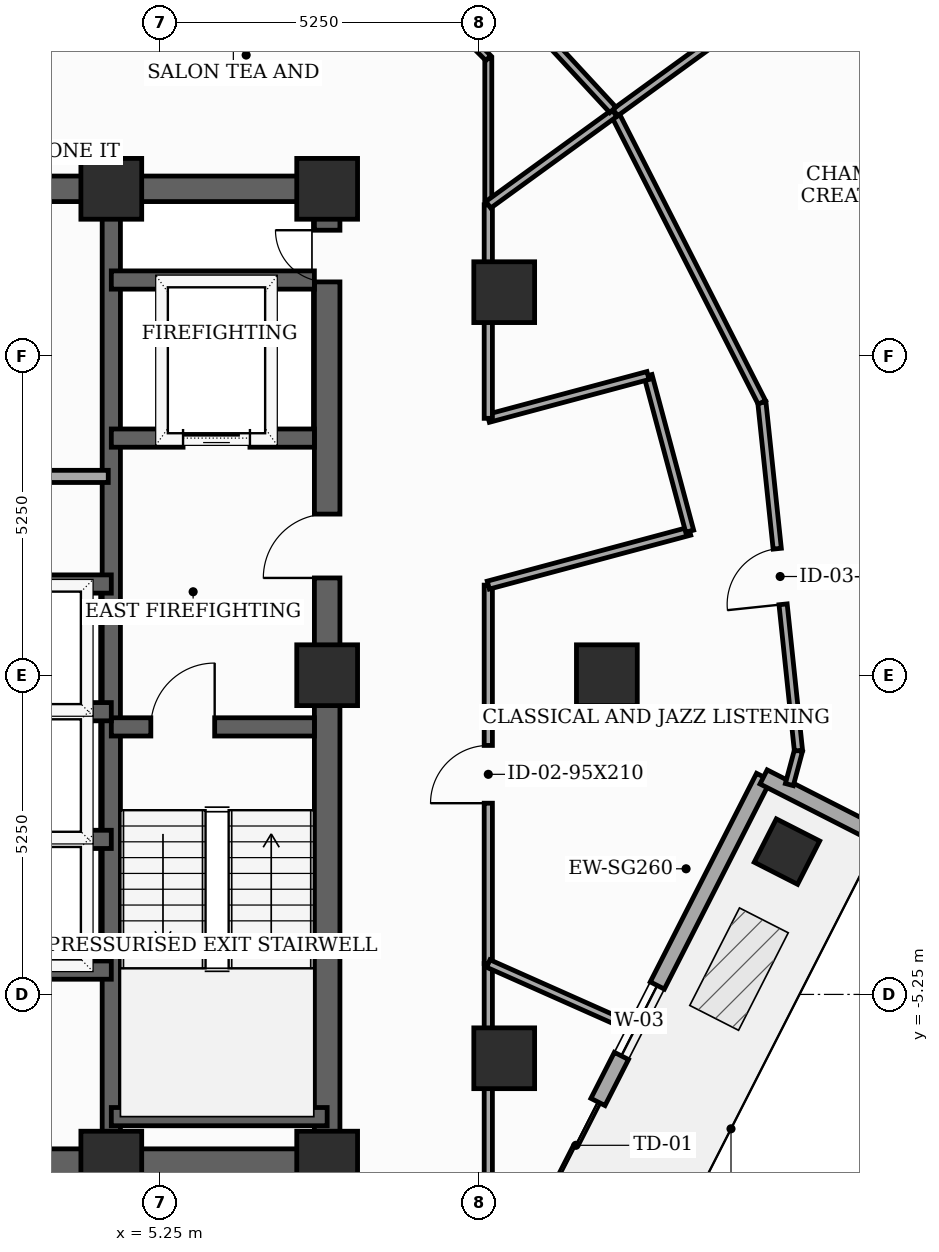
"""IFC4 building model, lengths in metres.
Left out: names, types, materials, properties, quantities, classifications, styles, units other than length and angle.
Written with IfcOpenShell. Run it as: python <this file> out.ifc"""

import sys

from ifc_helpers import new_model, si_unit, direction, frame, frame_2d, origin, origin_2d, place, context, subcontext, project, spatial, rectangle, extrude, element, fill, save


model = new_model("IFC4")
c1 = context("Model", 3, precision=1e-05, world=origin(), true_north=direction((0.0, 1.0)))
c2 = subcontext(c1, "Body", "Model", "MODEL_VIEW")
j1 = project(units=[si_unit("LENGTHUNIT", "METRE"), si_unit("PLANEANGLEUNIT", "RADIAN")], contexts=[c1])
p1 = place(None, origin())
s1 = spatial("IfcSite", under=j1, at=p1, CompositionType="ELEMENT")
p2 = place(p1, origin())
s2 = spatial("IfcBuilding", under=s1, at=p2, CompositionType="ELEMENT")
p3 = place(p2, frame((0.0, 0.0, 252.2)))
s3 = spatial("IfcBuildingStorey", under=s2, at=p3, CompositionType="ELEMENT", Elevation=252.2)
for number, where, z_axis, x_axis in (
    (1, (4.45, -8.0, 0.0), (0.0, 0.0, 1.0), (1.0, 0.0, 0.0)),
    (2, (8.0, -8.0, 0.0), (0.0, 0.0, 1.0), (1.0, 0.0, 0.0)),
    (3, (8.0, 0.0, 0.0), (0.0, 0.0, 1.0), (1.0, 0.0, 0.0)),
    (4, (8.0, 8.0, 0.0), (0.0, 0.0, 1.0), (1.0, 0.0, 0.0)),
    (5, (4.45, 8.0, 0.0), (0.0, 0.0, 1.0), (1.0, 0.0, 0.0)),
    (6, (12.6, 0.0, 0.0), (0.0, 0.0, 1.0), (1.0, 0.0, 0.0)),
    (7, (10.912, 6.3, 0.0), (0.0, 0.0, 1.0), (1.0, 0.0, 0.0)),
    (8, (10.912, -6.3, 0.0), (0.0, 0.0, 1.0), (1.0, 0.0, 0.0)),
):
    element("IfcColumn", number, at=place(p3, frame(where, z_axis=z_axis, x_axis=x_axis)), inside=s3, PredefinedType="COLUMN", context=c2, shape_type="SweptSolid", body=[
        extrude(rectangle(XDim=1.0, YDim=1.0, at=origin_2d()), origin(), (0.0, 0.0, 1.0), 3.7),
    ])
p4 = place(p3, frame((15.562, -2.901, 0.0), z_axis=(0.0, 0.0, 1.0), x_axis=(0.45399049974, 0.891006524188, 0.0)))
e9 = element("IfcColumn", 9, at=p4, inside=s3, PredefinedType="COLUMN", context=c2, shape_type="SweptSolid", body=[
    extrude(rectangle(XDim=0.8, YDim=0.8, at=origin_2d()), origin(), (0.0, 0.0, 1.0), 3.7),
])
p5 = place(p3, frame((10.274, -11.296, 0.0), z_axis=(0.0, 0.0, 1.0), x_axis=(0.453991476178, 0.891006026667, 0.0)))
e10 = element("IfcWall", 10, at=p5, inside=s3, PredefinedType="SOLIDWALL", context=c2, shape_type="SweptSolid", body=[
    extrude(rectangle(XDim=10.8, YDim=0.26, at=frame_2d((5.4, 0.0))), origin(), (0.0, 0.0, 1.0), 3.5),
])
p6 = place(p5, frame((3.2, 0.0, 0.0)))
e11 = element("IfcOpeningElement", 11, at=p6, cuts=e10, PredefinedType="OPENING", context=c2, shape_type="SweptSolid", body=[
    extrude(rectangle(XDim=1.6, YDim=2.08, at=frame_2d((0.8, 1.04))), frame((0.0, 0.14, 0.0), z_axis=(0.0, -1.0, 0.0), x_axis=(1.0, 0.0, 0.0)), (0.0, 0.0, 1.0), 0.28),
])
p7 = place(p5, frame((5.65, 0.0, 0.85)))
e12 = element("IfcOpeningElement", 12, at=p7, cuts=e10, PredefinedType="OPENING", context=c2, shape_type="SweptSolid", body=[
    extrude(rectangle(XDim=1.3, YDim=1.25, at=frame_2d((0.65, 0.625))), frame((0.0, 0.14, 0.0), z_axis=(0.0, -1.0, 0.0), x_axis=(1.0, 0.0, 0.0)), (0.0, 0.0, 1.0), 0.28),
])
p8 = place(p3, frame((15.177, -1.673, 0.0), z_axis=(0.0, 0.0, 1.0), x_axis=(0.890994427822, -0.454014239413, 0.0)))
e13 = element("IfcWall", 13, at=p8, inside=s3, PredefinedType="SOLIDWALL", context=c2, shape_type="SweptSolid", body=[
    extrude(rectangle(XDim=2.15, YDim=0.26, at=frame_2d((1.075, 0.0))), origin(), (0.0, 0.0, 1.0), 3.5),
])
p9 = place(p3, frame((8.0, -8.0, 0.0), z_axis=(0.0, 0.0, 1.0), x_axis=(0.0, 1.0, 0.0)))
e14 = element("IfcWall", 14, at=p9, inside=s3, PredefinedType="SHEAR", context=c2, shape_type="SweptSolid", body=[
    extrude(rectangle(XDim=16.0, YDim=0.42, at=frame_2d((8.0, 0.0))), origin(), (0.0, 0.0, 1.0), 3.5),
])
p10 = place(p9, frame((9.6, 0.0, 0.0)))
e15 = element("IfcOpeningElement", 15, at=p10, cuts=e14, PredefinedType="OPENING", context=c2, shape_type="SweptSolid", body=[
    extrude(rectangle(XDim=1.05, YDim=2.15, at=frame_2d((0.525, 1.075))), frame((0.0, 0.22, 0.0), z_axis=(0.0, -1.0, 0.0), x_axis=(1.0, 0.0, 0.0)), (0.0, 0.0, 1.0), 0.44),
])
p11 = place(p9, frame((14.469, 0.0, 0.0)))
e16 = element("IfcOpeningElement", 16, at=p11, cuts=e14, PredefinedType="OPENING", context=c2, shape_type="SweptSolid", body=[
    extrude(rectangle(XDim=0.85, YDim=2.02, at=frame_2d((0.425, 1.01))), frame((0.0, 0.22, 0.0), z_axis=(0.0, -1.0, 0.0), x_axis=(1.0, 0.0, 0.0)), (0.0, 0.0, 1.0), 0.44),
])
p12 = place(p3, frame((-8.0, -8.0, 0.0), z_axis=(0.0, 0.0, 1.0), x_axis=(1.0, 0.0, 0.0)))
e17 = element("IfcWall", 17, at=p12, inside=s3, PredefinedType="SHEAR", context=c2, shape_type="SweptSolid", body=[
    extrude(rectangle(XDim=16.0, YDim=0.42, at=frame_2d((8.0, 0.0))), origin(), (0.0, 0.0, 1.0), 3.5),
])
p13 = place(p12, frame((7.52, 0.0, 0.0)))
e18 = element("IfcOpeningElement", 18, at=p13, cuts=e17, PredefinedType="OPENING", context=c2, shape_type="SweptSolid", body=[
    extrude(rectangle(XDim=0.95, YDim=2.1, at=frame_2d((0.475, 1.05))), frame((0.0, 0.22, 0.0), z_axis=(0.0, -1.0, 0.0), x_axis=(1.0, 0.0, 0.0)), (0.0, 0.0, 1.0), 0.44),
])
p14 = place(p3, frame((-8.0, 8.0, 0.0), z_axis=(0.0, 0.0, 1.0), x_axis=(1.0, 0.0, 0.0)))
e19 = element("IfcWall", 19, at=p14, inside=s3, PredefinedType="SHEAR", context=c2, shape_type="SweptSolid", body=[
    extrude(rectangle(XDim=16.0, YDim=0.42, at=frame_2d((8.0, 0.0))), origin(), (0.0, 0.0, 1.0), 3.5),
])
p15 = place(p14, frame((7.1, 0.0, 0.0)))
e20 = element("IfcOpeningElement", 20, at=p15, cuts=e19, PredefinedType="OPENING", context=c2, shape_type="SweptSolid", body=[
    extrude(rectangle(XDim=1.8, YDim=2.15, at=frame_2d((0.9, 1.075))), frame((0.0, 0.22, 0.0), z_axis=(0.0, -1.0, 0.0), x_axis=(1.0, 0.0, 0.0)), (0.0, 0.0, 1.0), 0.44),
])
p16 = place(p3, frame((4.45, -7.79, 0.0), z_axis=(0.0, 0.0, 1.0), x_axis=(0.0, 1.0, 0.0)))
e21 = element("IfcWall", 21, at=p16, inside=s3, PredefinedType="SHEAR", context=c2, shape_type="SweptSolid", body=[
    extrude(rectangle(XDim=15.58, YDim=0.3, at=frame_2d((7.79, 0.0))), origin(), (0.0, 0.0, 1.0), 3.5),
])
p17 = place(p3, frame((4.45, -0.85, 0.0), z_axis=(0.0, 0.0, 1.0), x_axis=(1.0, 0.0, 0.0)))
e22 = element("IfcWall", 22, at=p17, inside=s3, PredefinedType="SHEAR", context=c2, shape_type="SweptSolid", body=[
    extrude(rectangle(XDim=3.34, YDim=0.3, at=frame_2d((1.67, 0.0))), origin(), (0.0, 0.0, 1.0), 3.5),
])
p18 = place(p17, frame((0.65, 0.0, 0.0)))
e23 = element("IfcOpeningElement", 23, at=p18, cuts=e22, PredefinedType="OPENING", context=c2, shape_type="SweptSolid", body=[
    extrude(rectangle(XDim=1.05, YDim=2.15, at=frame_2d((0.525, 1.075))), frame((0.0, 0.16, 0.0), z_axis=(0.0, -1.0, 0.0), x_axis=(1.0, 0.0, 0.0)), (0.0, 0.0, 1.0), 0.32),
])
p19 = place(p3, frame((4.45, -7.26, 0.0), z_axis=(0.0, 0.0, 1.0), x_axis=(1.0, 0.0, 0.0)))
e24 = element("IfcWall", 24, at=p19, inside=s3, PredefinedType="SHEAR", context=c2, shape_type="SweptSolid", body=[
    extrude(rectangle(XDim=3.55, YDim=0.3, at=frame_2d((1.775, 0.0))), origin(), (0.0, 0.0, 1.0), 3.5),
])
p20 = place(p3, frame((4.45, 3.9, 0.0), z_axis=(0.0, 0.0, 1.0), x_axis=(1.0, 0.0, 0.0)))
e25 = element("IfcWall", 25, at=p20, inside=s3, PredefinedType="SHEAR", context=c2, shape_type="SweptSolid", body=[
    extrude(rectangle(XDim=3.34, YDim=0.3, at=frame_2d((1.67, 0.0))), origin(), (0.0, 0.0, 1.0), 3.5),
])
p21 = place(p20, frame((1.18, 0.0, 0.0)))
e26 = element("IfcOpeningElement", 26, at=p21, cuts=e25, PredefinedType="OPENING", context=c2, shape_type="SweptSolid", body=[
    extrude(rectangle(XDim=1.1, YDim=2.1, at=frame_2d((0.55, 1.05))), frame((0.0, 0.16, 0.0), z_axis=(0.0, -1.0, 0.0), x_axis=(1.0, 0.0, 0.0)), (0.0, 0.0, 1.0), 0.32),
])
p22 = place(p3, frame((4.45, 6.5, 0.0), z_axis=(0.0, 0.0, 1.0), x_axis=(1.0, 0.0, 0.0)))
e27 = element("IfcWall", 27, at=p22, inside=s3, PredefinedType="SHEAR", context=c2, shape_type="SweptSolid", body=[
    extrude(rectangle(XDim=3.34, YDim=0.3, at=frame_2d((1.67, 0.0))), origin(), (0.0, 0.0, 1.0), 3.5),
])
p23 = place(p3, frame((-4.45, -4.85, 0.0), z_axis=(0.0, 0.0, 1.0), x_axis=(1.0, 0.0, 0.0)))
e28 = element("IfcWall", 28, at=p23, inside=s3, PredefinedType="SHEAR", context=c2, shape_type="SweptSolid", body=[
    extrude(rectangle(XDim=8.9, YDim=0.3, at=frame_2d((4.45, 0.0))), origin(), (0.0, 0.0, 1.0), 3.5),
])
for number, where, z_axis, x_axis in (
    (29, (1.68, 1.5, 0.0), (0.0, 0.0, 1.0), (1.0, 0.0, 0.0)),
    (30, (1.68, -2.7, 0.0), (0.0, 0.0, 1.0), (1.0, 0.0, 0.0)),
    (31, (1.68, -0.6, 0.0), (0.0, 0.0, 1.0), (1.0, 0.0, 0.0)),
):
    element("IfcWall", number, at=place(p3, frame(where, z_axis=z_axis, x_axis=x_axis)), inside=s3, PredefinedType="SHEAR", context=c2, shape_type="SweptSolid", body=[
        extrude(rectangle(XDim=2.77, YDim=0.3, at=frame_2d((1.385, 0.0))), origin(), (0.0, 0.0, 1.0), 3.5),
    ])
p24 = place(p3, frame((1.72, 3.27, 0.0), z_axis=(0.0, 0.0, 1.0), x_axis=(1.0, 0.0, 0.0)))
e32 = element("IfcWall", 32, at=p24, inside=s3, PredefinedType="SOLIDWALL", context=c2, shape_type="SweptSolid", body=[
    extrude(rectangle(XDim=2.68, YDim=0.2, at=frame_2d((1.34, 0.0))), origin(), (0.0, 0.0, 1.0), 3.5),
])
p25 = place(p3, frame((10.65, -4.742, 0.0), z_axis=(0.0, 0.0, 1.0), x_axis=(0.0, 1.0, 0.0)))
e33 = element("IfcWall", 33, at=p25, inside=s3, PredefinedType="PARTITIONING", context=c2, shape_type="SweptSolid", body=[
    extrude(rectangle(XDim=6.224, YDim=0.135, at=frame_2d((3.112, 0.0))), origin(), (0.0, 0.0, 1.0), 2.885),
])
p26 = place(p25, frame((2.637, 0.0, 0.0)))
e34 = element("IfcOpeningElement", 34, at=p26, cuts=e33, PredefinedType="OPENING", context=c2, shape_type="SweptSolid", body=[
    extrude(rectangle(XDim=0.95, YDim=2.1, at=frame_2d((0.475, 1.05))), frame((0.0, 0.077, 0.0), z_axis=(0.0, -1.0, 0.0), x_axis=(1.0, 0.0, 0.0)), (0.0, 0.0, 1.0), 0.155),
])
p27 = place(p3, frame((10.65, 1.482, 0.0), z_axis=(0.0, 0.0, 1.0), x_axis=(0.965961397105, 0.2586862565, 0.0)))
e35 = element("IfcWall", 35, at=p27, inside=s3, PredefinedType="PARTITIONING", context=c2, shape_type="SweptSolid", body=[
    extrude(rectangle(XDim=3.429, YDim=0.135, at=frame_2d((1.714, 0.0))), origin(), (0.0, 0.0, 1.0), 2.885),
])
p28 = place(p3, frame((13.962, 2.369, 0.0), z_axis=(0.0, 0.0, 1.0), x_axis=(-0.258413725385, 0.966034340245, 0.0)))
e36 = element("IfcWall", 36, at=p28, inside=s3, PredefinedType="PARTITIONING", context=c2, shape_type="SweptSolid", body=[
    extrude(rectangle(XDim=2.65, YDim=0.135, at=frame_2d((1.325, 0.0))), origin(), (0.0, 0.0, 1.0), 3.5),
])
p29 = place(p3, frame((13.277, 4.929, 0.0), z_axis=(0.0, 0.0, 1.0), x_axis=(-0.965934830229, -0.258785439601, 0.0)))
e37 = element("IfcWall", 37, at=p29, inside=s3, PredefinedType="PARTITIONING", context=c2, shape_type="SweptSolid", body=[
    extrude(rectangle(XDim=2.72, YDim=0.135, at=frame_2d((1.36, 0.0))), origin(), (0.0, 0.0, 1.0), 2.885),
])
p30 = place(p3, frame((10.65, 4.225, 0.0), z_axis=(0.0, 0.0, 1.0), x_axis=(0.0, 1.0, 0.0)))
e38 = element("IfcWall", 38, at=p30, inside=s3, PredefinedType="PARTITIONING", context=c2, shape_type="SweptSolid", body=[
    extrude(rectangle(XDim=3.513, YDim=0.135, at=frame_2d((1.756, 0.0))), origin(), (0.0, 0.0, 1.0), 2.885),
])
p31 = place(p3, frame((10.65, -10.15, 0.0), z_axis=(0.0, 0.0, 1.0), x_axis=(0.0, 1.0, 0.0)))
e39 = element("IfcWall", 39, at=p31, inside=s3, PredefinedType="PARTITIONING", context=c2, shape_type="SweptSolid", body=[
    extrude(rectangle(XDim=5.408, YDim=0.135, at=frame_2d((2.704, 0.0))), origin(), (0.0, 0.0, 1.0), 2.885),
])
p32 = place(p3, frame((10.65, 7.738, 0.0), z_axis=(0.0, 0.0, 1.0), x_axis=(0.0, 1.0, 0.0)))
e40 = element("IfcWall", 40, at=p32, inside=s3, PredefinedType="PARTITIONING", context=c2, shape_type="SweptSolid", body=[
    extrude(rectangle(XDim=2.412, YDim=0.115, at=frame_2d((1.206, 0.0))), origin(), (0.0, 0.0, 1.0), 3.5),
])
p33 = place(p3, frame((10.65, 10.15, 0.0), z_axis=(0.0, 0.0, 1.0), x_axis=(-0.707106781187, 0.707106781187, 0.0)))
e41 = element("IfcWall", 41, at=p33, inside=s3, PredefinedType="PARTITIONING", context=c2, shape_type="SweptSolid", body=[
    extrude(rectangle(XDim=0.707, YDim=0.115, at=frame_2d((0.354, 0.0))), origin(), (0.0, 0.0, 1.0), 3.5),
])
p34 = place(p3, frame((10.65, -4.742, 0.0), z_axis=(0.0, 0.0, 1.0), x_axis=(0.913666216357, -0.406465306131, 0.0)))
e42 = element("IfcWall", 42, at=p34, inside=s3, PredefinedType="PARTITIONING", context=c2, shape_type="SweptSolid", body=[
    extrude(rectangle(XDim=2.564, YDim=0.135, at=frame_2d((1.282, 0.0))), origin(), (0.0, 0.0, 1.0), 2.885),
])
p35 = place(p3, frame((15.601, -1.799, 0.0), z_axis=(0.0, 0.0, 1.0), x_axis=(0.258686866039, 0.96596123387, 0.0)))
e43 = element("IfcWall", 43, at=p35, inside=s3, PredefinedType="PARTITIONING", context=c2, shape_type="SweptSolid", body=[
    extrude(rectangle(XDim=0.579, YDim=0.135, at=frame_2d((0.289, 0.0))), origin(), (0.0, 0.0, 1.0), 3.5),
])
p36 = place(p3, frame((15.751, -1.24, 0.0), z_axis=(0.0, 0.0, 1.0), x_axis=(-0.104547955553, 0.994519846453, 0.0)))
e44 = element("IfcWall", 44, at=p36, inside=s3, PredefinedType="PARTITIONING", context=c2, shape_type="SweptSolid", body=[
    extrude(rectangle(XDim=5.759, YDim=0.135, at=frame_2d((2.879, 0.0))), origin(), (0.0, 0.0, 1.0), 3.035),
])
p37 = place(p36, frame((2.419, 0.0, 0.0)))
e45 = element("IfcOpeningElement", 45, at=p37, cuts=e44, PredefinedType="OPENING", context=c2, shape_type="SweptSolid", body=[
    extrude(rectangle(XDim=0.92, YDim=2.1, at=frame_2d((0.46, 1.05))), frame((0.0, 0.077, 0.0), z_axis=(0.0, -1.0, 0.0), x_axis=(1.0, 0.0, 0.0)), (0.0, 0.0, 1.0), 0.155),
])
p38 = place(p3, frame((15.149, 4.487, 0.0), z_axis=(0.0, 0.0, 1.0), x_axis=(-0.453912768225, 0.891046126102, 0.0)))
e46 = element("IfcWall", 46, at=p38, inside=s3, PredefinedType="PARTITIONING", context=c2, shape_type="SweptSolid", body=[
    extrude(rectangle(XDim=5.34, YDim=0.135, at=frame_2d((2.67, 0.0))), origin(), (0.0, 0.0, 1.0), 3.185),
])
p39 = place(p3, frame((12.725, 9.245, 0.0), z_axis=(0.0, 0.0, 1.0), x_axis=(-0.809135191367, -0.587622533683, 0.0)))
e47 = element("IfcWall", 47, at=p39, inside=s3, PredefinedType="PARTITIONING", context=c2, shape_type="SweptSolid", body=[
    extrude(rectangle(XDim=2.565, YDim=0.135, at=frame_2d((1.282, 0.0))), origin(), (0.0, 0.0, 1.0), 3.185),
])
p40 = place(p3, frame((23.394, 16.997, 0.0), z_axis=(0.0, 0.0, 1.0), x_axis=(-0.80901413128, -0.587789192985, 0.0)))
e48 = element("IfcWall", 48, at=p40, inside=s3, PredefinedType="PARTITIONING", context=c2, shape_type="SweptSolid", body=[
    extrude(rectangle(XDim=13.171, YDim=0.135, at=frame_2d((6.586, 0.0))), origin(), (0.0, 0.0, 1.0), 3.035),
])
p41 = place(p3, frame((9.943, 12.279, 0.0), z_axis=(0.0, 0.0, 1.0), x_axis=(0.678829604912, -0.734295831049, 0.0)))
e49 = element("IfcWall", 49, at=p41, inside=s3, PredefinedType="PARTITIONING", context=c2, shape_type="SweptSolid", body=[
    extrude(rectangle(XDim=4.058, YDim=0.135, at=frame_2d((2.029, 0.0))), origin(), (0.0, 0.0, 1.0), 3.185),
])
p42 = place(p6, frame((1.6, 0.0, 0.0), z_axis=(0.0, 0.0, 1.0), x_axis=(-1.0, 0.0, 0.0)))
e50 = element("IfcDoor", 50, at=p42, inside=s3, OperationType="DOUBLE_DOOR_SLIDING", PredefinedType="DOOR", context=c2, shape_type="SweptSolid", body=[
    extrude(rectangle(XDim=1.6, YDim=2.08, at=frame_2d((0.8, 1.04))), frame((0.0, 0.025, 0.0), z_axis=(0.0, -1.0, 0.0), x_axis=(1.0, 0.0, 0.0)), (0.0, 0.0, 1.0), 0.05),
])
fill(e11, e50)
p43 = place(p7, origin())
e51 = element("IfcWindow", 51, at=p43, inside=s3, PartitioningType="SINGLE_PANEL", PredefinedType="WINDOW", context=c2, shape_type="SweptSolid", body=[
    extrude(rectangle(XDim=1.3, YDim=1.25, at=frame_2d((0.65, 0.625))), frame((0.0, 0.03, 0.0), z_axis=(0.0, -1.0, 0.0), x_axis=(1.0, 0.0, 0.0)), (0.0, 0.0, 1.0), 0.06),
])
fill(e12, e51)
p44 = place(p10, origin())
e52 = element("IfcDoor", 52, at=p44, inside=s3, OperationType="SINGLE_SWING_LEFT", PredefinedType="DOOR", context=c2, shape_type="SweptSolid", body=[
    extrude(rectangle(XDim=1.05, YDim=2.15, at=frame_2d((0.525, 1.075))), frame((0.0, 0.025, 0.0), z_axis=(0.0, -1.0, 0.0), x_axis=(1.0, 0.0, 0.0)), (0.0, 0.0, 1.0), 0.05),
])
fill(e15, e52)
p45 = place(p11, origin())
e53 = element("IfcDoor", 53, at=p45, inside=s3, OperationType="SINGLE_SWING_RIGHT", PredefinedType="TRAPDOOR", context=c2, shape_type="SweptSolid", body=[
    extrude(rectangle(XDim=0.85, YDim=2.02, at=frame_2d((0.425, 1.01))), frame((0.0, 0.025, 0.0), z_axis=(0.0, -1.0, 0.0), x_axis=(1.0, 0.0, 0.0)), (0.0, 0.0, 1.0), 0.05),
])
fill(e16, e53)
p46 = place(p18, origin())
e54 = element("IfcDoor", 54, at=p46, inside=s3, OperationType="SINGLE_SWING_RIGHT", PredefinedType="DOOR", context=c2, shape_type="SweptSolid", body=[
    extrude(rectangle(XDim=1.05, YDim=2.15, at=frame_2d((0.525, 1.075))), frame((0.0, 0.025, 0.0), z_axis=(0.0, -1.0, 0.0), x_axis=(1.0, 0.0, 0.0)), (0.0, 0.0, 1.0), 0.05),
])
fill(e23, e54)
p47 = place(p21, origin())
e55 = element("IfcDoor", 55, at=p47, inside=s3, OperationType="SLIDING_TO_LEFT", PredefinedType="DOOR", context=c2, shape_type="SweptSolid", body=[
    extrude(rectangle(XDim=1.1, YDim=2.1, at=frame_2d((0.55, 1.05))), frame((0.0, 0.025, 0.0), z_axis=(0.0, -1.0, 0.0), x_axis=(1.0, 0.0, 0.0)), (0.0, 0.0, 1.0), 0.05),
])
fill(e26, e55)
p48 = place(p26, origin())
e56 = element("IfcDoor", 56, at=p48, inside=s3, OperationType="SINGLE_SWING_LEFT", PredefinedType="DOOR", context=c2, shape_type="SweptSolid", body=[
    extrude(rectangle(XDim=0.95, YDim=2.1, at=frame_2d((0.475, 1.05))), frame((0.0, 0.025, 0.0), z_axis=(0.0, -1.0, 0.0), x_axis=(1.0, 0.0, 0.0)), (0.0, 0.0, 1.0), 0.05),
])
fill(e34, e56)
p49 = place(p37, origin())
e57 = element("IfcDoor", 57, at=p49, inside=s3, OperationType="SINGLE_SWING_LEFT", PredefinedType="DOOR", context=c2, shape_type="SweptSolid", body=[
    extrude(rectangle(XDim=0.92, YDim=2.1, at=frame_2d((0.46, 1.05))), frame((0.0, 0.025, 0.0), z_axis=(0.0, -1.0, 0.0), x_axis=(1.0, 0.0, 0.0)), (0.0, 0.0, 1.0), 0.05),
])
fill(e45, e57)
save(model, sys.argv[1])
